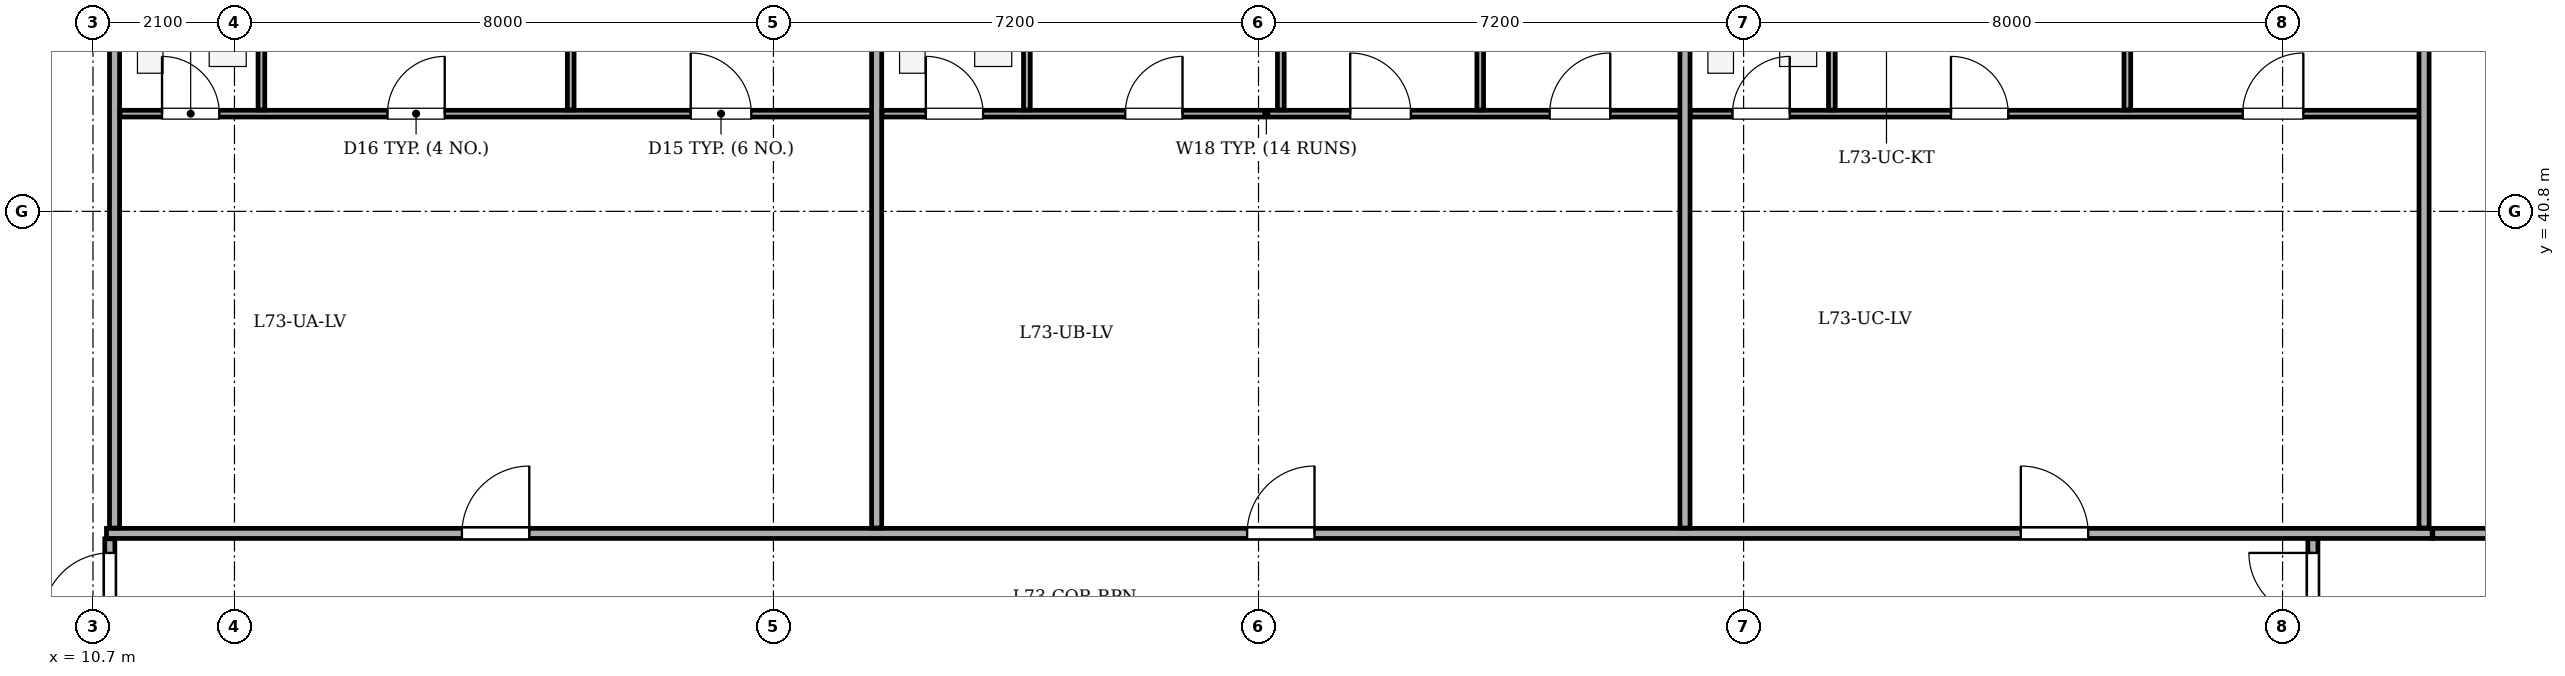
"""IFC4 building model, lengths in metres.
Left out: names, types, materials, properties, quantities, classifications, styles, units other than length and angle.
Written with IfcOpenShell. Run it as: python <this file> out.ifc"""

import sys

from ifc_helpers import new_model, si_unit, direction, frame, frame_2d, origin, place, context, subcontext, project, spatial, rectangle, extrude, element, fill, save


model = new_model("IFC4")
c1 = context("Model", 3, precision=1e-05, world=origin(), true_north=direction((0.0, 1.0)))
c2 = subcontext(c1, "Body", "Model", "MODEL_VIEW")
j1 = project(units=[si_unit("LENGTHUNIT", "METRE"), si_unit("PLANEANGLEUNIT", "RADIAN")], contexts=[c1])
p1 = place(None, origin())
s1 = spatial("IfcSite", under=j1, at=p1, CompositionType="ELEMENT")
p2 = place(p1, origin())
s2 = spatial("IfcBuilding", under=s1, at=p2, CompositionType="ELEMENT")
p3 = place(p2, frame((0.0, 0.0, 275.5)))
s3 = spatial("IfcBuildingStorey", under=s2, at=p3, CompositionType="ELEMENT", Elevation=275.5)
p4 = place(p3, frame((45.3, 44.92, 0.0), z_axis=(0.0, 0.0, 1.0), x_axis=(0.70712937715, -0.707084184501, 0.0)))
e1 = element("IfcWall", 1, at=p4, inside=s3, PredefinedType="STANDARD", context=c2, shape_type="SweptSolid", body=[
    extrude(rectangle(XDim=5.402, YDim=0.32, at=frame_2d((2.701, 0.0))), origin(), (0.0, 0.0, 1.0), 2.725),
])
p5 = place(p4, frame((2.001, 0.0, 0.75)))
e2 = element("IfcOpeningElement", 2, at=p5, cuts=e1, PredefinedType="OPENING", context=c2, shape_type="SweptSolid", body=[
    extrude(rectangle(XDim=1.4, YDim=1.65, at=frame_2d((0.7, 0.825))), frame((0.0, 0.17, 0.0), z_axis=(0.0, -1.0, 0.0), x_axis=(1.0, 0.0, 0.0)), (0.0, 0.0, 1.0), 0.34),
])
p6 = place(p3, frame((10.9, 36.02, 0.0), z_axis=(0.0, 0.0, 1.0), x_axis=(1.0, 0.0, 0.0)))
e3 = element("IfcWall", 3, at=p6, inside=s3, PredefinedType="PARTITIONING", context=c2, shape_type="SweptSolid", body=[
    extrude(rectangle(XDim=34.52, YDim=0.15, at=frame_2d((17.26, 0.0))), origin(), (0.0, 0.0, 1.0), 3.1),
])
p7 = place(p6, frame((5.276, 0.0, 0.0)))
e4 = element("IfcOpeningElement", 4, at=p7, cuts=e3, PredefinedType="OPENING", context=c2, shape_type="SweptSolid", body=[
    extrude(rectangle(XDim=1.0, YDim=2.1, at=frame_2d((0.5, 1.05))), frame((0.0, 0.085, 0.0), z_axis=(0.0, -1.0, 0.0), x_axis=(1.0, 0.0, 0.0)), (0.0, 0.0, 1.0), 0.17),
])
p8 = place(p6, frame((16.931, 0.0, 0.0)))
e5 = element("IfcOpeningElement", 5, at=p8, cuts=e3, PredefinedType="OPENING", context=c2, shape_type="SweptSolid", body=[
    extrude(rectangle(XDim=1.0, YDim=2.1, at=frame_2d((0.5, 1.05))), frame((0.0, 0.085, 0.0), z_axis=(0.0, -1.0, 0.0), x_axis=(1.0, 0.0, 0.0)), (0.0, 0.0, 1.0), 0.17),
])
p9 = place(p6, frame((28.415, 0.0, 0.0)))
e6 = element("IfcOpeningElement", 6, at=p9, cuts=e3, PredefinedType="OPENING", context=c2, shape_type="SweptSolid", body=[
    extrude(rectangle(XDim=1.0, YDim=2.1, at=frame_2d((0.5, 1.05))), frame((0.0, 0.085, 0.0), z_axis=(0.0, -1.0, 0.0), x_axis=(1.0, 0.0, 0.0)), (0.0, 0.0, 1.0), 0.17),
])
p10 = place(p3, frame((11.02, 36.1, 0.0), z_axis=(0.0, 0.0, 1.0), x_axis=(0.0, 1.0, 0.0)))
e7 = element("IfcWall", 7, at=p10, inside=s3, PredefinedType="PARTITIONING", context=c2, shape_type="SweptSolid", body=[
    extrude(rectangle(XDim=8.655, YDim=0.15, at=frame_2d((4.327, 0.0))), origin(), (0.0, 0.0, 1.0), 3.1),
])
p11 = place(p3, frame((11.1, 42.25, 0.0), z_axis=(0.0, 0.0, 1.0), x_axis=(1.0, 0.0, 0.0)))
e8 = element("IfcWall", 8, at=p11, inside=s3, PredefinedType="PARTITIONING", context=c2, shape_type="SweptSolid", body=[
    extrude(rectangle(XDim=11.272, YDim=0.1, at=frame_2d((5.636, 0.0))), origin(), (0.0, 0.0, 1.0), 3.1),
])
p12 = place(p11, frame((0.625, 0.0, 0.0)))
e9 = element("IfcOpeningElement", 9, at=p12, cuts=e8, PredefinedType="OPENING", context=c2, shape_type="SweptSolid", body=[
    extrude(rectangle(XDim=0.85, YDim=2.05, at=frame_2d((0.425, 1.025))), frame((0.0, 0.06, 0.0), z_axis=(0.0, -1.0, 0.0), x_axis=(1.0, 0.0, 0.0)), (0.0, 0.0, 1.0), 0.12),
])
p13 = place(p11, frame((3.971, 0.0, 0.0)))
e10 = element("IfcOpeningElement", 10, at=p13, cuts=e8, PredefinedType="OPENING", context=c2, shape_type="SweptSolid", body=[
    extrude(rectangle(XDim=0.85, YDim=2.05, at=frame_2d((0.425, 1.025))), frame((0.0, 0.06, 0.0), z_axis=(0.0, -1.0, 0.0), x_axis=(1.0, 0.0, 0.0)), (0.0, 0.0, 1.0), 0.12),
])
p14 = place(p11, frame((8.472, 0.0, 0.0)))
e11 = element("IfcOpeningElement", 11, at=p14, cuts=e8, PredefinedType="OPENING", context=c2, shape_type="SweptSolid", body=[
    extrude(rectangle(XDim=0.9, YDim=2.05, at=frame_2d((0.45, 1.025))), frame((0.0, 0.06, 0.0), z_axis=(0.0, -1.0, 0.0), x_axis=(1.0, 0.0, 0.0)), (0.0, 0.0, 1.0), 0.12),
])
p15 = place(p3, frame((13.2, 42.305, 0.0), z_axis=(0.0, 0.0, 1.0), x_axis=(0.0, 1.0, 0.0)))
e12 = element("IfcWall", 12, at=p15, inside=s3, PredefinedType="PARTITIONING", context=c2, shape_type="SweptSolid", body=[
    extrude(rectangle(XDim=2.45, YDim=0.1, at=frame_2d((1.225, 0.0))), origin(), (0.0, 0.0, 1.0), 3.1),
])
p16 = place(p3, frame((17.791, 42.305, 0.0), z_axis=(0.0, 0.0, 1.0), x_axis=(0.0, 1.0, 0.0)))
e13 = element("IfcWall", 13, at=p16, inside=s3, PredefinedType="PARTITIONING", context=c2, shape_type="SweptSolid", body=[
    extrude(rectangle(XDim=2.45, YDim=0.1, at=frame_2d((1.225, 0.0))), origin(), (0.0, 0.0, 1.0), 2.725),
])
p17 = place(p3, frame((22.332, 36.1, 0.0), z_axis=(0.0, 0.0, 1.0), x_axis=(0.0, 1.0, 0.0)))
e14 = element("IfcWall", 14, at=p17, inside=s3, PredefinedType="PARTITIONING", context=c2, shape_type="SweptSolid", body=[
    extrude(rectangle(XDim=8.655, YDim=0.15, at=frame_2d((4.327, 0.0))), origin(), (0.0, 0.0, 1.0), 2.725),
])
p18 = place(p3, frame((22.412, 42.25, 0.0), z_axis=(0.0, 0.0, 1.0), x_axis=(1.0, 0.0, 0.0)))
e15 = element("IfcWall", 15, at=p18, inside=s3, PredefinedType="PARTITIONING", context=c2, shape_type="SweptSolid", body=[
    extrude(rectangle(XDim=11.958, YDim=0.1, at=frame_2d((5.979, 0.0))), origin(), (0.0, 0.0, 1.0), 3.1),
])
p19 = place(p18, frame((0.65, 0.0, 0.0)))
e16 = element("IfcOpeningElement", 16, at=p19, cuts=e15, PredefinedType="OPENING", context=c2, shape_type="SweptSolid", body=[
    extrude(rectangle(XDim=0.85, YDim=2.05, at=frame_2d((0.425, 1.025))), frame((0.0, 0.06, 0.0), z_axis=(0.0, -1.0, 0.0), x_axis=(1.0, 0.0, 0.0)), (0.0, 0.0, 1.0), 0.12),
])
p20 = place(p18, frame((3.61, 0.0, 0.0)))
e17 = element("IfcOpeningElement", 17, at=p20, cuts=e15, PredefinedType="OPENING", context=c2, shape_type="SweptSolid", body=[
    extrude(rectangle(XDim=0.85, YDim=2.05, at=frame_2d((0.425, 1.025))), frame((0.0, 0.06, 0.0), z_axis=(0.0, -1.0, 0.0), x_axis=(1.0, 0.0, 0.0)), (0.0, 0.0, 1.0), 0.12),
])
p21 = place(p18, frame((6.949, 0.0, 0.0)))
e18 = element("IfcOpeningElement", 18, at=p21, cuts=e15, PredefinedType="OPENING", context=c2, shape_type="SweptSolid", body=[
    extrude(rectangle(XDim=0.9, YDim=2.05, at=frame_2d((0.45, 1.025))), frame((0.0, 0.06, 0.0), z_axis=(0.0, -1.0, 0.0), x_axis=(1.0, 0.0, 0.0)), (0.0, 0.0, 1.0), 0.12),
])
p22 = place(p18, frame((9.909, 0.0, 0.0)))
e19 = element("IfcOpeningElement", 19, at=p22, cuts=e15, PredefinedType="OPENING", context=c2, shape_type="SweptSolid", body=[
    extrude(rectangle(XDim=0.9, YDim=2.05, at=frame_2d((0.45, 1.025))), frame((0.0, 0.06, 0.0), z_axis=(0.0, -1.0, 0.0), x_axis=(1.0, 0.0, 0.0)), (0.0, 0.0, 1.0), 0.12),
])
for number, where, z_axis, x_axis in (
    (20, (24.562, 42.305, 0.0), (0.0, 0.0, 1.0), (0.0, 1.0, 0.0)),
    (21, (28.331, 42.305, 0.0), (0.0, 0.0, 1.0), (0.0, 1.0, 0.0)),
    (22, (31.291, 42.305, 0.0), (0.0, 0.0, 1.0), (0.0, 1.0, 0.0)),
):
    element("IfcWall", number, at=place(p3, frame(where, z_axis=z_axis, x_axis=x_axis)), inside=s3, PredefinedType="PARTITIONING", context=c2, shape_type="SweptSolid", body=[
        extrude(rectangle(XDim=2.45, YDim=0.1, at=frame_2d((1.225, 0.0))), origin(), (0.0, 0.0, 1.0), 3.1),
    ])
p23 = place(p3, frame((34.33, 36.1, 0.0), z_axis=(0.0, 0.0, 1.0), x_axis=(0.0, 1.0, 0.0)))
e23 = element("IfcWall", 23, at=p23, inside=s3, PredefinedType="PARTITIONING", context=c2, shape_type="SweptSolid", body=[
    extrude(rectangle(XDim=8.655, YDim=0.15, at=frame_2d((4.327, 0.0))), origin(), (0.0, 0.0, 1.0), 3.1),
])
p24 = place(p3, frame((34.41, 42.25, 0.0), z_axis=(0.0, 0.0, 1.0), x_axis=(1.0, 0.0, 0.0)))
e24 = element("IfcWall", 24, at=p24, inside=s3, PredefinedType="PARTITIONING", context=c2, shape_type="SweptSolid", body=[
    extrude(rectangle(XDim=10.93, YDim=0.1, at=frame_2d((5.465, 0.0))), origin(), (0.0, 0.0, 1.0), 3.1),
])
p25 = place(p24, frame((0.625, 0.0, 0.0)))
e25 = element("IfcOpeningElement", 25, at=p25, cuts=e24, PredefinedType="OPENING", context=c2, shape_type="SweptSolid", body=[
    extrude(rectangle(XDim=0.85, YDim=2.05, at=frame_2d((0.425, 1.025))), frame((0.0, 0.06, 0.0), z_axis=(0.0, -1.0, 0.0), x_axis=(1.0, 0.0, 0.0)), (0.0, 0.0, 1.0), 0.12),
])
p26 = place(p24, frame((3.868, 0.0, 0.0)))
e26 = element("IfcOpeningElement", 26, at=p26, cuts=e24, PredefinedType="OPENING", context=c2, shape_type="SweptSolid", body=[
    extrude(rectangle(XDim=0.85, YDim=2.05, at=frame_2d((0.425, 1.025))), frame((0.0, 0.06, 0.0), z_axis=(0.0, -1.0, 0.0), x_axis=(1.0, 0.0, 0.0)), (0.0, 0.0, 1.0), 0.12),
])
p27 = place(p24, frame((8.198, 0.0, 0.0)))
e27 = element("IfcOpeningElement", 27, at=p27, cuts=e24, PredefinedType="OPENING", context=c2, shape_type="SweptSolid", body=[
    extrude(rectangle(XDim=0.9, YDim=2.05, at=frame_2d((0.45, 1.025))), frame((0.0, 0.06, 0.0), z_axis=(0.0, -1.0, 0.0), x_axis=(1.0, 0.0, 0.0)), (0.0, 0.0, 1.0), 0.12),
])
p28 = place(p3, frame((36.51, 42.305, 0.0), z_axis=(0.0, 0.0, 1.0), x_axis=(0.0, 1.0, 0.0)))
e28 = element("IfcWall", 28, at=p28, inside=s3, PredefinedType="PARTITIONING", context=c2, shape_type="SweptSolid", body=[
    extrude(rectangle(XDim=2.45, YDim=0.1, at=frame_2d((1.225, 0.0))), origin(), (0.0, 0.0, 1.0), 2.725),
])
p29 = place(p3, frame((40.896, 42.305, 0.0), z_axis=(0.0, 0.0, 1.0), x_axis=(0.0, 1.0, 0.0)))
e29 = element("IfcWall", 29, at=p29, inside=s3, PredefinedType="PARTITIONING", context=c2, shape_type="SweptSolid", body=[
    extrude(rectangle(XDim=2.45, YDim=0.1, at=frame_2d((1.225, 0.0))), origin(), (0.0, 0.0, 1.0), 3.1),
])
p30 = place(p3, frame((45.3, 36.1, 0.0), z_axis=(0.0, 0.0, 1.0), x_axis=(0.0, 1.0, 0.0)))
e30 = element("IfcWall", 30, at=p30, inside=s3, PredefinedType="PARTITIONING", context=c2, shape_type="SweptSolid", body=[
    extrude(rectangle(XDim=8.655, YDim=0.15, at=frame_2d((4.327, 0.0))), origin(), (0.0, 0.0, 1.0), 3.1),
])
p31 = place(p3, frame((10.95, 34.15, 0.0), z_axis=(0.0, 0.0, 1.0), x_axis=(0.0, 1.0, 0.0)))
e31 = element("IfcWall", 31, at=p31, inside=s3, PredefinedType="PARTITIONING", context=c2, shape_type="SweptSolid", body=[
    extrude(rectangle(XDim=1.79, YDim=0.15, at=frame_2d((0.895, 0.0))), origin(), (0.0, 0.0, 1.0), 3.1),
])
p32 = place(p31, frame((0.58, 0.0, 0.0)))
e32 = element("IfcOpeningElement", 32, at=p32, cuts=e31, PredefinedType="OPENING", context=c2, shape_type="SweptSolid", body=[
    extrude(rectangle(XDim=1.0, YDim=2.1, at=frame_2d((0.5, 1.05))), frame((0.0, 0.085, 0.0), z_axis=(0.0, -1.0, 0.0), x_axis=(1.0, 0.0, 0.0)), (0.0, 0.0, 1.0), 0.17),
])
p33 = place(p3, frame((45.43, 36.02, 0.0), z_axis=(0.0, 0.0, 1.0), x_axis=(1.0, 0.0, 0.0)))
e33 = element("IfcWall", 33, at=p33, inside=s3, PredefinedType="PARTITIONING", context=c2, shape_type="SweptSolid", body=[
    extrude(rectangle(XDim=3.525, YDim=0.15, at=frame_2d((1.763, 0.0))), origin(), (0.0, 0.0, 1.0), 3.1),
])
p34 = place(p3, frame((43.65, 34.15, 0.0), z_axis=(0.0, 0.0, 1.0), x_axis=(0.0, 1.0, 0.0)))
e34 = element("IfcWall", 34, at=p34, inside=s3, PredefinedType="PARTITIONING", context=c2, shape_type="SweptSolid", body=[
    extrude(rectangle(XDim=1.79, YDim=0.15, at=frame_2d((0.895, 0.0))), origin(), (0.0, 0.0, 1.0), 3.1),
])
p35 = place(p34, frame((0.63, 0.0, 0.0)))
e35 = element("IfcOpeningElement", 35, at=p35, cuts=e34, PredefinedType="OPENING", context=c2, shape_type="SweptSolid", body=[
    extrude(rectangle(XDim=0.95, YDim=2.1, at=frame_2d((0.475, 1.05))), frame((0.0, 0.085, 0.0), z_axis=(0.0, -1.0, 0.0), x_axis=(1.0, 0.0, 0.0)), (0.0, 0.0, 1.0), 0.17),
])
p36 = place(p7, origin())
e36 = element("IfcDoor", 36, at=p36, inside=s3, OperationType="SINGLE_SWING_RIGHT", PredefinedType="DOOR", context=c2, shape_type="SweptSolid", body=[
    extrude(rectangle(XDim=1.0, YDim=2.1, at=frame_2d((0.5, 1.05))), frame((0.0, 0.025, 0.0), z_axis=(0.0, -1.0, 0.0), x_axis=(1.0, 0.0, 0.0)), (0.0, 0.0, 1.0), 0.05),
])
fill(e4, e36)
p37 = place(p8, origin())
e37 = element("IfcDoor", 37, at=p37, inside=s3, OperationType="SINGLE_SWING_RIGHT", PredefinedType="DOOR", context=c2, shape_type="SweptSolid", body=[
    extrude(rectangle(XDim=1.0, YDim=2.1, at=frame_2d((0.5, 1.05))), frame((0.0, 0.025, 0.0), z_axis=(0.0, -1.0, 0.0), x_axis=(1.0, 0.0, 0.0)), (0.0, 0.0, 1.0), 0.05),
])
fill(e5, e37)
p38 = place(p9, origin())
e38 = element("IfcDoor", 38, at=p38, inside=s3, OperationType="SINGLE_SWING_LEFT", PredefinedType="DOOR", context=c2, shape_type="SweptSolid", body=[
    extrude(rectangle(XDim=1.0, YDim=2.1, at=frame_2d((0.5, 1.05))), frame((0.0, 0.025, 0.0), z_axis=(0.0, -1.0, 0.0), x_axis=(1.0, 0.0, 0.0)), (0.0, 0.0, 1.0), 0.05),
])
fill(e6, e38)
p39 = place(p12, origin())
e39 = element("IfcDoor", 39, at=p39, inside=s3, OperationType="SINGLE_SWING_LEFT", PredefinedType="DOOR", context=c2, shape_type="SweptSolid", body=[
    extrude(rectangle(XDim=0.85, YDim=2.05, at=frame_2d((0.425, 1.025))), frame((0.0, 0.025, 0.0), z_axis=(0.0, -1.0, 0.0), x_axis=(1.0, 0.0, 0.0)), (0.0, 0.0, 1.0), 0.05),
])
fill(e9, e39)
p40 = place(p13, origin())
e40 = element("IfcDoor", 40, at=p40, inside=s3, OperationType="SINGLE_SWING_RIGHT", PredefinedType="DOOR", context=c2, shape_type="SweptSolid", body=[
    extrude(rectangle(XDim=0.85, YDim=2.05, at=frame_2d((0.425, 1.025))), frame((0.0, 0.025, 0.0), z_axis=(0.0, -1.0, 0.0), x_axis=(1.0, 0.0, 0.0)), (0.0, 0.0, 1.0), 0.05),
])
fill(e10, e40)
p41 = place(p14, origin())
e41 = element("IfcDoor", 41, at=p41, inside=s3, OperationType="SINGLE_SWING_LEFT", PredefinedType="DOOR", context=c2, shape_type="SweptSolid", body=[
    extrude(rectangle(XDim=0.9, YDim=2.05, at=frame_2d((0.45, 1.025))), frame((0.0, 0.025, 0.0), z_axis=(0.0, -1.0, 0.0), x_axis=(1.0, 0.0, 0.0)), (0.0, 0.0, 1.0), 0.05),
])
fill(e11, e41)
p42 = place(p19, origin())
e42 = element("IfcDoor", 42, at=p42, inside=s3, OperationType="SINGLE_SWING_LEFT", PredefinedType="DOOR", context=c2, shape_type="SweptSolid", body=[
    extrude(rectangle(XDim=0.85, YDim=2.05, at=frame_2d((0.425, 1.025))), frame((0.0, 0.025, 0.0), z_axis=(0.0, -1.0, 0.0), x_axis=(1.0, 0.0, 0.0)), (0.0, 0.0, 1.0), 0.05),
])
fill(e16, e42)
p43 = place(p20, origin())
e43 = element("IfcDoor", 43, at=p43, inside=s3, OperationType="SINGLE_SWING_RIGHT", PredefinedType="DOOR", context=c2, shape_type="SweptSolid", body=[
    extrude(rectangle(XDim=0.85, YDim=2.05, at=frame_2d((0.425, 1.025))), frame((0.0, 0.025, 0.0), z_axis=(0.0, -1.0, 0.0), x_axis=(1.0, 0.0, 0.0)), (0.0, 0.0, 1.0), 0.05),
])
fill(e17, e43)
p44 = place(p21, origin())
e44 = element("IfcDoor", 44, at=p44, inside=s3, OperationType="SINGLE_SWING_LEFT", PredefinedType="DOOR", context=c2, shape_type="SweptSolid", body=[
    extrude(rectangle(XDim=0.9, YDim=2.05, at=frame_2d((0.45, 1.025))), frame((0.0, 0.025, 0.0), z_axis=(0.0, -1.0, 0.0), x_axis=(1.0, 0.0, 0.0)), (0.0, 0.0, 1.0), 0.05),
])
fill(e18, e44)
p45 = place(p22, origin())
e45 = element("IfcDoor", 45, at=p45, inside=s3, OperationType="SINGLE_SWING_RIGHT", PredefinedType="DOOR", context=c2, shape_type="SweptSolid", body=[
    extrude(rectangle(XDim=0.9, YDim=2.05, at=frame_2d((0.45, 1.025))), frame((0.0, 0.025, 0.0), z_axis=(0.0, -1.0, 0.0), x_axis=(1.0, 0.0, 0.0)), (0.0, 0.0, 1.0), 0.05),
])
fill(e19, e45)
p46 = place(p25, origin())
e46 = element("IfcDoor", 46, at=p46, inside=s3, OperationType="SINGLE_SWING_RIGHT", PredefinedType="DOOR", context=c2, shape_type="SweptSolid", body=[
    extrude(rectangle(XDim=0.85, YDim=2.05, at=frame_2d((0.425, 1.025))), frame((0.0, 0.025, 0.0), z_axis=(0.0, -1.0, 0.0), x_axis=(1.0, 0.0, 0.0)), (0.0, 0.0, 1.0), 0.05),
])
fill(e25, e46)
p47 = place(p26, origin())
e47 = element("IfcDoor", 47, at=p47, inside=s3, OperationType="SINGLE_SWING_LEFT", PredefinedType="DOOR", context=c2, shape_type="SweptSolid", body=[
    extrude(rectangle(XDim=0.85, YDim=2.05, at=frame_2d((0.425, 1.025))), frame((0.0, 0.025, 0.0), z_axis=(0.0, -1.0, 0.0), x_axis=(1.0, 0.0, 0.0)), (0.0, 0.0, 1.0), 0.05),
])
fill(e26, e47)
p48 = place(p27, origin())
e48 = element("IfcDoor", 48, at=p48, inside=s3, OperationType="SINGLE_SWING_RIGHT", PredefinedType="DOOR", context=c2, shape_type="SweptSolid", body=[
    extrude(rectangle(XDim=0.9, YDim=2.05, at=frame_2d((0.45, 1.025))), frame((0.0, 0.025, 0.0), z_axis=(0.0, -1.0, 0.0), x_axis=(1.0, 0.0, 0.0)), (0.0, 0.0, 1.0), 0.05),
])
fill(e27, e48)
p49 = place(p32, origin())
e49 = element("IfcDoor", 49, at=p49, inside=s3, OperationType="SINGLE_SWING_LEFT", PredefinedType="DOOR", context=c2, shape_type="SweptSolid", body=[
    extrude(rectangle(XDim=1.0, YDim=2.1, at=frame_2d((0.5, 1.05))), frame((0.0, 0.025, 0.0), z_axis=(0.0, -1.0, 0.0), x_axis=(1.0, 0.0, 0.0)), (0.0, 0.0, 1.0), 0.05),
])
fill(e32, e49)
p50 = place(p35, origin())
e50 = element("IfcDoor", 50, at=p50, inside=s3, OperationType="SINGLE_SWING_RIGHT", PredefinedType="DOOR", context=c2, shape_type="SweptSolid", body=[
    extrude(rectangle(XDim=0.95, YDim=2.1, at=frame_2d((0.475, 1.05))), frame((0.0, 0.025, 0.0), z_axis=(0.0, -1.0, 0.0), x_axis=(1.0, 0.0, 0.0)), (0.0, 0.0, 1.0), 0.05),
])
fill(e35, e50)
save(model, sys.argv[1])
